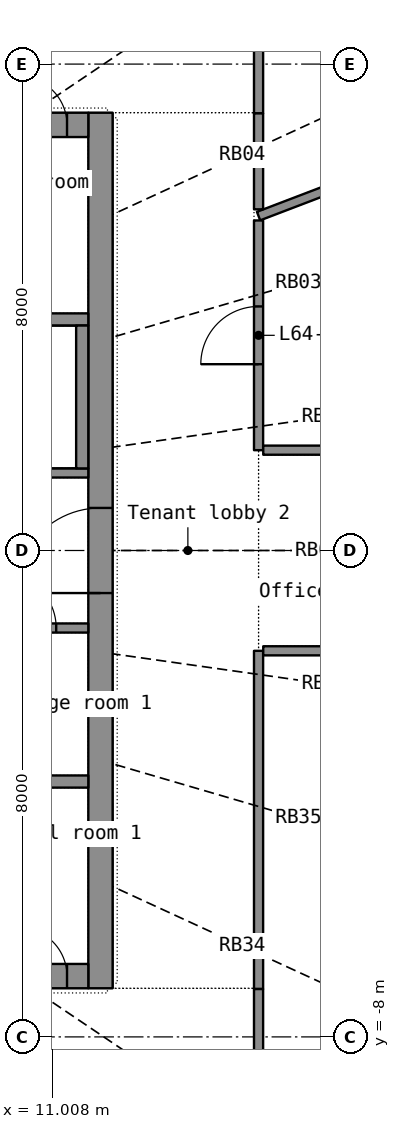
"""IFC4 building model, lengths in metres.
Left out: names, types, materials, properties, quantities, classifications, styles, units other than length and angle.
Written with IfcOpenShell. Run it as: python <this file> out.ifc"""

import sys

from ifc_helpers import new_model, si_unit, direction, frame, frame_2d, origin, place, context, subcontext, project, spatial, rectangle, extrude, element, fill, save


model = new_model("IFC4")
c1 = context("Model", 3, precision=1e-05, world=origin(), true_north=direction((0.0, 1.0)))
c2 = subcontext(c1, "Body", "Model", "MODEL_VIEW")
j1 = project(units=[si_unit("LENGTHUNIT", "METRE"), si_unit("PLANEANGLEUNIT", "RADIAN")], contexts=[c1])
p1 = place(None, origin())
s1 = spatial("IfcSite", under=j1, at=p1, CompositionType="ELEMENT")
p2 = place(p1, origin())
s2 = spatial("IfcBuilding", under=s1, at=p2, CompositionType="ELEMENT")
p3 = place(p2, frame((0.0, 0.0, 261.5)))
s3 = spatial("IfcBuildingStorey", under=s2, at=p3, CompositionType="ELEMENT", Elevation=261.5)
p4 = place(p3, frame((11.8, -7.2, 0.0), z_axis=(0.0, 0.0, 1.0), x_axis=(0.0, 1.0, 0.0)))
e1 = element("IfcWall", 1, at=p4, inside=s3, PredefinedType="SHEAR", context=c2, shape_type="SweptSolid", body=[
    extrude(rectangle(XDim=14.4, YDim=0.4, at=frame_2d((7.2, 0.0))), origin(), (0.0, 0.0, 1.0), 3.3),
])
p5 = place(p4, frame((6.5, 0.0, 0.0)))
e2 = element("IfcOpeningElement", 2, at=p5, cuts=e1, PredefinedType="OPENING", context=c2, shape_type="SweptSolid", body=[
    extrude(rectangle(XDim=1.4, YDim=2.2, at=frame_2d((0.7, 1.1))), frame((0.0, 0.21, 0.0), z_axis=(0.0, -1.0, 0.0), x_axis=(1.0, 0.0, 0.0)), (0.0, 0.0, 1.0), 0.42),
])
p6 = place(p3, frame((-11.6, -7.0, 0.0), z_axis=(0.0, 0.0, 1.0), x_axis=(1.0, 0.0, 0.0)))
e3 = element("IfcWall", 3, at=p6, inside=s3, PredefinedType="SHEAR", context=c2, shape_type="SweptSolid", body=[
    extrude(rectangle(XDim=23.2, YDim=0.4, at=frame_2d((11.6, 0.0))), origin(), (0.0, 0.0, 1.0), 3.3),
])
p7 = place(p6, frame((20.05, 0.0, 0.0)))
e4 = element("IfcOpeningElement", 4, at=p7, cuts=e3, PredefinedType="OPENING", context=c2, shape_type="SweptSolid", body=[
    extrude(rectangle(XDim=1.1, YDim=2.2, at=frame_2d((0.55, 1.1))), frame((0.0, 0.21, 0.0), z_axis=(0.0, -1.0, 0.0), x_axis=(1.0, 0.0, 0.0)), (0.0, 0.0, 1.0), 0.42),
])
p8 = place(p6, frame((3.15, 0.0, 0.0)))
e5 = element("IfcOpeningElement", 5, at=p8, cuts=e3, PredefinedType="OPENING", context=c2, shape_type="SweptSolid", body=[
    extrude(rectangle(XDim=0.9, YDim=2.1, at=frame_2d((0.45, 1.05))), frame((0.0, 0.21, 0.0), z_axis=(0.0, -1.0, 0.0), x_axis=(1.0, 0.0, 0.0)), (0.0, 0.0, 1.0), 0.42),
])
p9 = place(p6, frame((9.15, 0.0, 0.0)))
e6 = element("IfcOpeningElement", 6, at=p9, cuts=e3, PredefinedType="OPENING", context=c2, shape_type="SweptSolid", body=[
    extrude(rectangle(XDim=0.9, YDim=2.1, at=frame_2d((0.45, 1.05))), frame((0.0, 0.21, 0.0), z_axis=(0.0, -1.0, 0.0), x_axis=(1.0, 0.0, 0.0)), (0.0, 0.0, 1.0), 0.42),
])
p10 = place(p6, frame((16.15, 0.0, 0.0)))
e7 = element("IfcOpeningElement", 7, at=p10, cuts=e3, PredefinedType="OPENING", context=c2, shape_type="SweptSolid", body=[
    extrude(rectangle(XDim=0.9, YDim=2.1, at=frame_2d((0.45, 1.05))), frame((0.0, 0.21, 0.0), z_axis=(0.0, -1.0, 0.0), x_axis=(1.0, 0.0, 0.0)), (0.0, 0.0, 1.0), 0.42),
])
p11 = place(p6, frame((0.35, 0.0, 0.0)))
e8 = element("IfcOpeningElement", 8, at=p11, cuts=e3, PredefinedType="OPENING", context=c2, shape_type="SweptSolid", body=[
    extrude(rectangle(XDim=0.8, YDim=2.05, at=frame_2d((0.4, 1.025))), frame((0.0, 0.21, 0.0), z_axis=(0.0, -1.0, 0.0), x_axis=(1.0, 0.0, 0.0)), (0.0, 0.0, 1.0), 0.42),
])
p12 = place(p6, frame((22.05, 0.0, 0.0)))
e9 = element("IfcOpeningElement", 9, at=p12, cuts=e3, PredefinedType="OPENING", context=c2, shape_type="SweptSolid", body=[
    extrude(rectangle(XDim=0.8, YDim=2.05, at=frame_2d((0.4, 1.025))), frame((0.0, 0.21, 0.0), z_axis=(0.0, -1.0, 0.0), x_axis=(1.0, 0.0, 0.0)), (0.0, 0.0, 1.0), 0.42),
])
p13 = place(p3, frame((-11.6, 7.0, 0.0), z_axis=(0.0, 0.0, 1.0), x_axis=(1.0, 0.0, 0.0)))
e10 = element("IfcWall", 10, at=p13, inside=s3, PredefinedType="SHEAR", context=c2, shape_type="SweptSolid", body=[
    extrude(rectangle(XDim=23.2, YDim=0.4, at=frame_2d((11.6, 0.0))), origin(), (0.0, 0.0, 1.0), 3.3),
])
p14 = place(p13, frame((2.05, 0.0, 0.0)))
e11 = element("IfcOpeningElement", 11, at=p14, cuts=e10, PredefinedType="OPENING", context=c2, shape_type="SweptSolid", body=[
    extrude(rectangle(XDim=1.1, YDim=2.2, at=frame_2d((0.55, 1.1))), frame((0.0, 0.21, 0.0), z_axis=(0.0, -1.0, 0.0), x_axis=(1.0, 0.0, 0.0)), (0.0, 0.0, 1.0), 0.42),
])
p15 = place(p13, frame((6.05, 0.0, 0.0)))
e12 = element("IfcOpeningElement", 12, at=p15, cuts=e10, PredefinedType="OPENING", context=c2, shape_type="SweptSolid", body=[
    extrude(rectangle(XDim=1.1, YDim=2.2, at=frame_2d((0.55, 1.1))), frame((0.0, 0.21, 0.0), z_axis=(0.0, -1.0, 0.0), x_axis=(1.0, 0.0, 0.0)), (0.0, 0.0, 1.0), 0.42),
])
p16 = place(p13, frame((8.05, 0.0, 0.0)))
e13 = element("IfcOpeningElement", 13, at=p16, cuts=e10, PredefinedType="OPENING", context=c2, shape_type="SweptSolid", body=[
    extrude(rectangle(XDim=1.1, YDim=2.2, at=frame_2d((0.55, 1.1))), frame((0.0, 0.21, 0.0), z_axis=(0.0, -1.0, 0.0), x_axis=(1.0, 0.0, 0.0)), (0.0, 0.0, 1.0), 0.42),
])
p17 = place(p13, frame((10.05, 0.0, 0.0)))
e14 = element("IfcOpeningElement", 14, at=p17, cuts=e10, PredefinedType="OPENING", context=c2, shape_type="SweptSolid", body=[
    extrude(rectangle(XDim=1.1, YDim=2.2, at=frame_2d((0.55, 1.1))), frame((0.0, 0.21, 0.0), z_axis=(0.0, -1.0, 0.0), x_axis=(1.0, 0.0, 0.0)), (0.0, 0.0, 1.0), 0.42),
])
p18 = place(p13, frame((12.05, 0.0, 0.0)))
e15 = element("IfcOpeningElement", 15, at=p18, cuts=e10, PredefinedType="OPENING", context=c2, shape_type="SweptSolid", body=[
    extrude(rectangle(XDim=1.1, YDim=2.2, at=frame_2d((0.55, 1.1))), frame((0.0, 0.21, 0.0), z_axis=(0.0, -1.0, 0.0), x_axis=(1.0, 0.0, 0.0)), (0.0, 0.0, 1.0), 0.42),
])
p19 = place(p13, frame((14.05, 0.0, 0.0)))
e16 = element("IfcOpeningElement", 16, at=p19, cuts=e10, PredefinedType="OPENING", context=c2, shape_type="SweptSolid", body=[
    extrude(rectangle(XDim=1.1, YDim=2.2, at=frame_2d((0.55, 1.1))), frame((0.0, 0.21, 0.0), z_axis=(0.0, -1.0, 0.0), x_axis=(1.0, 0.0, 0.0)), (0.0, 0.0, 1.0), 0.42),
])
p20 = place(p13, frame((16.05, 0.0, 0.0)))
e17 = element("IfcOpeningElement", 17, at=p20, cuts=e10, PredefinedType="OPENING", context=c2, shape_type="SweptSolid", body=[
    extrude(rectangle(XDim=1.1, YDim=2.2, at=frame_2d((0.55, 1.1))), frame((0.0, 0.21, 0.0), z_axis=(0.0, -1.0, 0.0), x_axis=(1.0, 0.0, 0.0)), (0.0, 0.0, 1.0), 0.42),
])
p21 = place(p13, frame((18.05, 0.0, 0.0)))
e18 = element("IfcOpeningElement", 18, at=p21, cuts=e10, PredefinedType="OPENING", context=c2, shape_type="SweptSolid", body=[
    extrude(rectangle(XDim=1.1, YDim=2.2, at=frame_2d((0.55, 1.1))), frame((0.0, 0.21, 0.0), z_axis=(0.0, -1.0, 0.0), x_axis=(1.0, 0.0, 0.0)), (0.0, 0.0, 1.0), 0.42),
])
p22 = place(p13, frame((20.05, 0.0, 0.0)))
e19 = element("IfcOpeningElement", 19, at=p22, cuts=e10, PredefinedType="OPENING", context=c2, shape_type="SweptSolid", body=[
    extrude(rectangle(XDim=1.1, YDim=2.2, at=frame_2d((0.55, 1.1))), frame((0.0, 0.21, 0.0), z_axis=(0.0, -1.0, 0.0), x_axis=(1.0, 0.0, 0.0)), (0.0, 0.0, 1.0), 0.42),
])
p23 = place(p13, frame((4.15, 0.0, 0.0)))
e20 = element("IfcOpeningElement", 20, at=p23, cuts=e10, PredefinedType="OPENING", context=c2, shape_type="SweptSolid", body=[
    extrude(rectangle(XDim=0.9, YDim=2.1, at=frame_2d((0.45, 1.05))), frame((0.0, 0.21, 0.0), z_axis=(0.0, -1.0, 0.0), x_axis=(1.0, 0.0, 0.0)), (0.0, 0.0, 1.0), 0.42),
])
p24 = place(p13, frame((0.35, 0.0, 0.0)))
e21 = element("IfcOpeningElement", 21, at=p24, cuts=e10, PredefinedType="OPENING", context=c2, shape_type="SweptSolid", body=[
    extrude(rectangle(XDim=0.8, YDim=2.05, at=frame_2d((0.4, 1.025))), frame((0.0, 0.21, 0.0), z_axis=(0.0, -1.0, 0.0), x_axis=(1.0, 0.0, 0.0)), (0.0, 0.0, 1.0), 0.42),
])
p25 = place(p13, frame((22.05, 0.0, 0.0)))
e22 = element("IfcOpeningElement", 22, at=p25, cuts=e10, PredefinedType="OPENING", context=c2, shape_type="SweptSolid", body=[
    extrude(rectangle(XDim=0.8, YDim=2.05, at=frame_2d((0.4, 1.025))), frame((0.0, 0.21, 0.0), z_axis=(0.0, -1.0, 0.0), x_axis=(1.0, 0.0, 0.0)), (0.0, 0.0, 1.0), 0.42),
])
for number, where, z_axis, x_axis in (
    (23, (-11.6, -3.8, 0.0), (0.0, 0.0, 1.0), (1.0, 0.0, 0.0)),
    (24, (-11.6, 3.8, 0.0), (0.0, 0.0, 1.0), (1.0, 0.0, 0.0)),
):
    element("IfcWall", number, at=place(p3, frame(where, z_axis=z_axis, x_axis=x_axis)), inside=s3, PredefinedType="SHEAR", context=c2, shape_type="SweptSolid", body=[
        extrude(rectangle(XDim=23.2, YDim=0.2, at=frame_2d((11.6, 0.0))), origin(), (0.0, 0.0, 1.0), 3.3),
    ])
p26 = place(p3, frame((3.0, -1.275, 0.0), z_axis=(0.0, 0.0, 1.0), x_axis=(1.0, 0.0, 0.0)))
e25 = element("IfcWall", 25, at=p26, inside=s3, PredefinedType="PARTITIONING", context=c2, shape_type="SweptSolid", body=[
    extrude(rectangle(XDim=8.6, YDim=0.15, at=frame_2d((4.3, 0.0))), origin(), (0.0, 0.0, 1.0), 3.3),
])
p27 = place(p26, frame((0.635, 0.0, 0.0)))
e26 = element("IfcOpeningElement", 26, at=p27, cuts=e25, PredefinedType="OPENING", context=c2, shape_type="SweptSolid", body=[
    extrude(rectangle(XDim=0.85, YDim=2.1, at=frame_2d((0.425, 1.05))), frame((0.0, 0.085, 0.0), z_axis=(0.0, -1.0, 0.0), x_axis=(1.0, 0.0, 0.0)), (0.0, 0.0, 1.0), 0.17),
])
p28 = place(p26, frame((2.904, 0.0, 0.0)))
e27 = element("IfcOpeningElement", 27, at=p28, cuts=e25, PredefinedType="OPENING", context=c2, shape_type="SweptSolid", body=[
    extrude(rectangle(XDim=0.85, YDim=2.1, at=frame_2d((0.425, 1.05))), frame((0.0, 0.085, 0.0), z_axis=(0.0, -1.0, 0.0), x_axis=(1.0, 0.0, 0.0)), (0.0, 0.0, 1.0), 0.17),
])
p29 = place(p26, frame((5.066, 0.0, 0.0)))
e28 = element("IfcOpeningElement", 28, at=p29, cuts=e25, PredefinedType="OPENING", context=c2, shape_type="SweptSolid", body=[
    extrude(rectangle(XDim=0.9, YDim=2.1, at=frame_2d((0.45, 1.05))), frame((0.0, 0.085, 0.0), z_axis=(0.0, -1.0, 0.0), x_axis=(1.0, 0.0, 0.0)), (0.0, 0.0, 1.0), 0.17),
])
p30 = place(p26, frame((7.172, 0.0, 0.0)))
e29 = element("IfcOpeningElement", 29, at=p30, cuts=e25, PredefinedType="OPENING", context=c2, shape_type="SweptSolid", body=[
    extrude(rectangle(XDim=0.9, YDim=2.1, at=frame_2d((0.45, 1.05))), frame((0.0, 0.085, 0.0), z_axis=(0.0, -1.0, 0.0), x_axis=(1.0, 0.0, 0.0)), (0.0, 0.0, 1.0), 0.17),
])
p31 = place(p3, frame((3.0, 1.275, 0.0), z_axis=(0.0, 0.0, 1.0), x_axis=(1.0, 0.0, 0.0)))
e30 = element("IfcWall", 30, at=p31, inside=s3, PredefinedType="SHEAR", context=c2, shape_type="SweptSolid", body=[
    extrude(rectangle(XDim=8.6, YDim=0.15, at=frame_2d((4.3, 0.0))), origin(), (0.0, 0.0, 1.0), 3.3),
])
p32 = place(p31, frame((2.05, 0.0, 0.0)))
e31 = element("IfcOpeningElement", 31, at=p32, cuts=e30, PredefinedType="OPENING", context=c2, shape_type="SweptSolid", body=[
    extrude(rectangle(XDim=1.1, YDim=2.15, at=frame_2d((0.55, 1.075))), frame((0.0, 0.085, 0.0), z_axis=(0.0, -1.0, 0.0), x_axis=(1.0, 0.0, 0.0)), (0.0, 0.0, 1.0), 0.17),
])
p33 = place(p31, frame((0.45, 0.0, 0.0)))
e32 = element("IfcOpeningElement", 32, at=p33, cuts=e30, PredefinedType="OPENING", context=c2, shape_type="SweptSolid", body=[
    extrude(rectangle(XDim=0.9, YDim=2.1, at=frame_2d((0.45, 1.05))), frame((0.0, 0.085, 0.0), z_axis=(0.0, -1.0, 0.0), x_axis=(1.0, 0.0, 0.0)), (0.0, 0.0, 1.0), 0.17),
])
p34 = place(p3, frame((11.5, 1.35, 0.0), z_axis=(0.0, 0.0, 1.0), x_axis=(0.0, 1.0, 0.0)))
e33 = element("IfcWall", 33, at=p34, inside=s3, PredefinedType="SHEAR", context=c2, shape_type="SweptSolid", body=[
    extrude(rectangle(XDim=2.35, YDim=0.2, at=frame_2d((1.175, 0.0))), origin(), (0.0, 0.0, 1.0), 3.3),
])
p35 = place(p3, frame((14.4, -7.212, 0.0), z_axis=(0.0, 0.0, 1.0), x_axis=(0.0, 1.0, 0.0)))
e34 = element("IfcWall", 34, at=p35, inside=s3, PredefinedType="PARTITIONING", context=c2, shape_type="SweptSolid", body=[
    extrude(rectangle(XDim=5.562, YDim=0.15, at=frame_2d((2.781, 0.0))), origin(), (0.0, 0.0, 1.0), 2.4),
])
p36 = place(p3, frame((18.341, 7.006, 0.0), z_axis=(0.0, 0.0, 1.0), x_axis=(-0.934181218, -0.356798897, 0.0)))
e35 = element("IfcWall", 35, at=p36, inside=s3, PredefinedType="PARTITIONING", context=c2, shape_type="SweptSolid", body=[
    extrude(rectangle(XDim=4.219, YDim=0.15, at=frame_2d((2.109, 0.0))), origin(), (0.0, 0.0, 1.0), 2.4),
])
p37 = place(p3, frame((14.4, 1.65, 0.0), z_axis=(0.0, 0.0, 1.0), x_axis=(0.0, 1.0, 0.0)))
e36 = element("IfcWall", 36, at=p37, inside=s3, PredefinedType="PARTITIONING", context=c2, shape_type="SweptSolid", body=[
    extrude(rectangle(XDim=3.778, YDim=0.15, at=frame_2d((1.889, 0.0))), origin(), (0.0, 0.0, 1.0), 2.4),
])
p38 = place(p37, frame((1.414, 0.0, 0.0)))
e37 = element("IfcOpeningElement", 37, at=p38, cuts=e36, PredefinedType="OPENING", context=c2, shape_type="SweptSolid", body=[
    extrude(rectangle(XDim=0.95, YDim=2.15, at=frame_2d((0.475, 1.075))), frame((0.0, 0.085, 0.0), z_axis=(0.0, -1.0, 0.0), x_axis=(1.0, 0.0, 0.0)), (0.0, 0.0, 1.0), 0.17),
])
for number, where, z_axis, x_axis in (
    (38, (14.477, -1.65, 0.0), (0.0, 0.0, 1.0), (1.0, 0.0, 0.0)),
    (39, (17.601, 1.65, 0.0), (0.0, 0.0, 1.0), (-1.0, 0.0, 0.0)),
):
    element("IfcWall", number, at=place(p3, frame(where, z_axis=z_axis, x_axis=x_axis)), inside=s3, PredefinedType="PARTITIONING", context=c2, shape_type="SweptSolid", body=[
        extrude(rectangle(XDim=3.124, YDim=0.15, at=frame_2d((1.562, 0.0))), origin(), (0.0, 0.0, 1.0), 2.4),
    ])
p39 = place(p3, frame((14.4, -9.523, 0.0), z_axis=(0.0, 0.0, 1.0), x_axis=(0.0, 1.0, 0.0)))
e40 = element("IfcWall", 40, at=p39, inside=s3, PredefinedType="PARTITIONING", context=c2, shape_type="SweptSolid", body=[
    extrude(rectangle(XDim=2.31, YDim=0.15, at=frame_2d((1.155, 0.0))), origin(), (0.0, 0.0, 1.0), 2.4),
])
p40 = place(p3, frame((14.4, 7.19, 0.0), z_axis=(0.0, 0.0, 1.0), x_axis=(0.0, 1.0, 0.0)))
e41 = element("IfcWall", 41, at=p40, inside=s3, PredefinedType="PARTITIONING", context=c2, shape_type="SweptSolid", body=[
    extrude(rectangle(XDim=2.333, YDim=0.15, at=frame_2d((1.167, 0.0))), origin(), (0.0, 0.0, 1.0), 2.4),
])
p41 = place(p3, frame((14.4, 5.611, 0.0), z_axis=(0.0, 0.0, 1.0), x_axis=(0.0, 1.0, 0.0)))
e42 = element("IfcWall", 42, at=p41, inside=s3, PredefinedType="PARTITIONING", context=c2, shape_type="SweptSolid", body=[
    extrude(rectangle(XDim=1.578, YDim=0.15, at=frame_2d((0.789, 0.0))), origin(), (0.0, 0.0, 1.0), 2.4),
])
p42 = place(p12, origin())
e43 = element("IfcDoor", 43, at=p42, inside=s3, OperationType="SINGLE_SWING_LEFT", PredefinedType="DOOR", context=c2, shape_type="SweptSolid", body=[
    extrude(rectangle(XDim=0.8, YDim=2.05, at=frame_2d((0.4, 1.025))), frame((0.0, 0.025, 0.0), z_axis=(0.0, -1.0, 0.0), x_axis=(1.0, 0.0, 0.0)), (0.0, 0.0, 1.0), 0.05),
])
fill(e9, e43)
p43 = place(p25, origin())
e44 = element("IfcDoor", 44, at=p43, inside=s3, OperationType="SINGLE_SWING_LEFT", PredefinedType="DOOR", context=c2, shape_type="SweptSolid", body=[
    extrude(rectangle(XDim=0.8, YDim=2.05, at=frame_2d((0.4, 1.025))), frame((0.0, 0.025, 0.0), z_axis=(0.0, -1.0, 0.0), x_axis=(1.0, 0.0, 0.0)), (0.0, 0.0, 1.0), 0.05),
])
fill(e22, e44)
p44 = place(p5, origin())
e45 = element("IfcDoor", 45, at=p44, inside=s3, OperationType="DOUBLE_DOOR_SINGLE_SWING", PredefinedType="DOOR", context=c2, shape_type="SweptSolid", body=[
    extrude(rectangle(XDim=1.4, YDim=2.2, at=frame_2d((0.7, 1.1))), frame((0.0, 0.025, 0.0), z_axis=(0.0, -1.0, 0.0), x_axis=(1.0, 0.0, 0.0)), (0.0, 0.0, 1.0), 0.05),
])
fill(e2, e45)
p45 = place(p30, origin())
e46 = element("IfcDoor", 46, at=p45, inside=s3, OperationType="SINGLE_SWING_LEFT", PredefinedType="DOOR", context=c2, shape_type="SweptSolid", body=[
    extrude(rectangle(XDim=0.9, YDim=2.1, at=frame_2d((0.45, 1.05))), frame((0.0, 0.025, 0.0), z_axis=(0.0, -1.0, 0.0), x_axis=(1.0, 0.0, 0.0)), (0.0, 0.0, 1.0), 0.05),
])
fill(e29, e46)
p46 = place(p38, origin())
e47 = element("IfcDoor", 47, at=p46, inside=s3, OperationType="SINGLE_SWING_LEFT", PredefinedType="DOOR", context=c2, shape_type="SweptSolid", body=[
    extrude(rectangle(XDim=0.95, YDim=2.15, at=frame_2d((0.475, 1.075))), frame((0.0, 0.025, 0.0), z_axis=(0.0, -1.0, 0.0), x_axis=(1.0, 0.0, 0.0)), (0.0, 0.0, 1.0), 0.05),
])
fill(e37, e47)
save(model, sys.argv[1])
